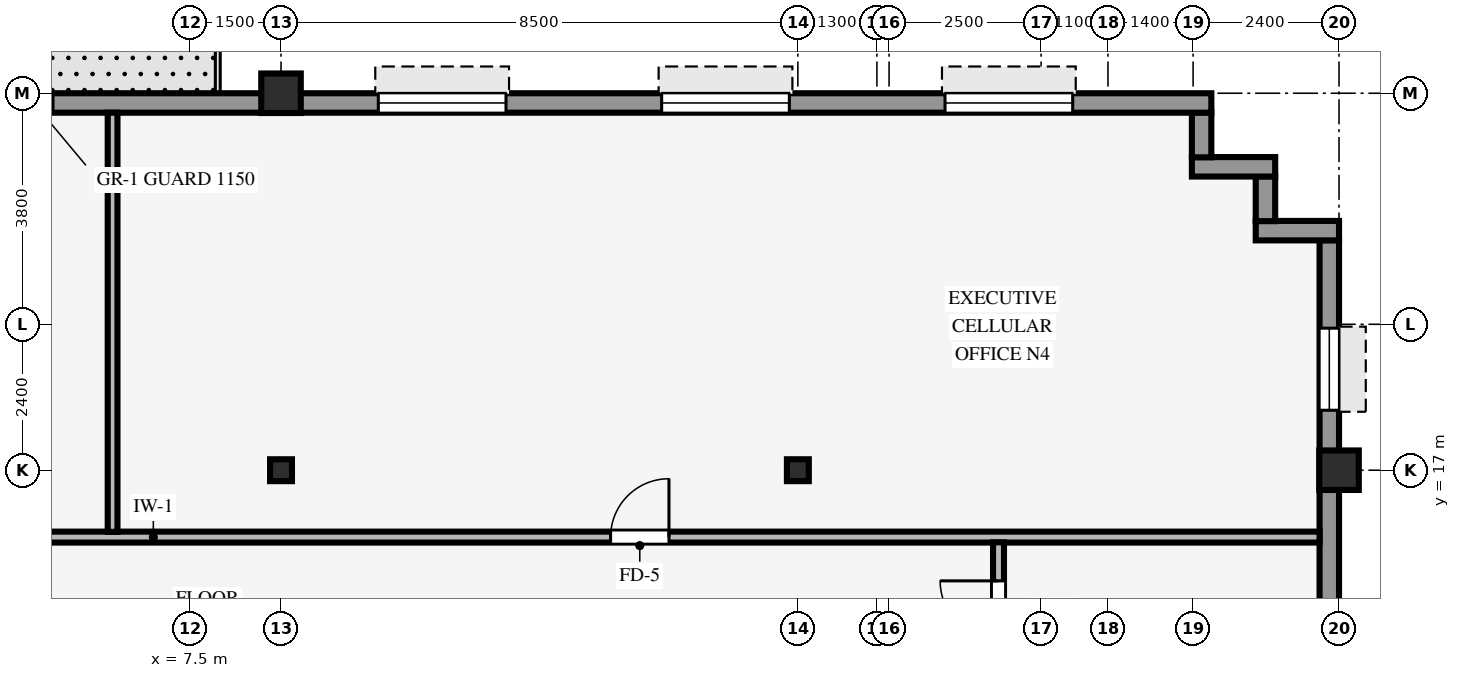
"""IFC4 building model, lengths in metres.
Left out: names, types, materials, properties, quantities, classifications, styles, units other than length and angle.
Written with IfcOpenShell. Run it as: python <this file> out.ifc"""

import sys

from ifc_helpers import new_model, si_unit, direction, frame, frame_2d, origin, origin_2d, place, context, subcontext, project, spatial, rectangle, hollow_rectangle, i_section, extrude, source, transform, mapped, element, fill, save


model = new_model("IFC4")
c1 = context("Model", 3, precision=1e-05, world=origin(), true_north=direction((0.0, 1.0)))
c2 = subcontext(c1, "Body", "Model", "MODEL_VIEW")
j1 = project(units=[si_unit("LENGTHUNIT", "METRE"), si_unit("PLANEANGLEUNIT", "RADIAN")], contexts=[c1])
p1 = place(None, origin())
s1 = spatial("IfcSite", under=j1, at=p1, CompositionType="ELEMENT")
p2 = place(p1, origin())
s2 = spatial("IfcBuilding", under=s1, at=p2, CompositionType="ELEMENT")
p3 = place(p2, frame((0.0, 0.0, 160.35)))
s3 = spatial("IfcBuildingStorey", under=s2, at=p3, CompositionType="ELEMENT", Elevation=160.35)
for number, where, z_axis, x_axis in (
    (1, (26.4, 17.0, 0.0), (0.0, 0.0, 1.0), (1.0, 0.0, 0.0)),
    (2, (9.0, 23.2, 0.0), (0.0, 0.0, 1.0), (1.0, 0.0, 0.0)),
):
    element("IfcColumn", number, at=place(p3, frame(where, z_axis=z_axis, x_axis=x_axis)), inside=s3, PredefinedType="COLUMN", context=c2, shape_type="SweptSolid", body=[
        extrude(hollow_rectangle(XDim=0.65, YDim=0.65, WallThickness=0.04, InnerFilletRadius=0.04, OuterFilletRadius=0.08, at=origin_2d()), origin(), (0.0, 0.0, 1.0), 3.37),
    ])
for number, where, z_axis, x_axis in (
    (3, (9.0, 17.0, 0.0), (0.0, 0.0, 1.0), (1.0, 0.0, 0.0)),
    (4, (17.5, 17.0, 0.0), (0.0, 0.0, 1.0), (1.0, 0.0, 0.0)),
):
    element("IfcColumn", number, at=place(p3, frame(where, z_axis=z_axis, x_axis=x_axis)), inside=s3, PredefinedType="COLUMN", context=c2, shape_type="SweptSolid", body=[
        extrude(i_section(OverallWidth=0.36, OverallDepth=0.36, WebThickness=0.021, FlangeThickness=0.021, FilletRadius=0.018, at=origin_2d()), origin(), (0.0, 0.0, 1.0), 3.37),
    ])
p4 = place(p3, frame((26.24, -20.784, 0.0), z_axis=(0.0, 0.0, 1.0), x_axis=(0.0, 1.0, 0.0)))
e5 = element("IfcWall", 5, at=p4, inside=s3, PredefinedType="STANDARD", context=c2, shape_type="SweptSolid", body=[
    extrude(rectangle(XDim=41.568, YDim=0.32, at=frame_2d((20.784, 0.0))), origin(), (0.0, 0.0, 1.0), 2.705),
])
p5 = place(p4, frame((1.448, 0.0, 0.8)))
e6 = element("IfcOpeningElement", 6, at=p5, cuts=e5, PredefinedType="OPENING", context=c2, shape_type="SweptSolid", body=[
    extrude(rectangle(XDim=1.35, YDim=1.56, at=frame_2d((0.675, 0.78))), frame((0.0, 0.17, 0.0), z_axis=(0.0, -1.0, 0.0), x_axis=(1.0, 0.0, 0.0)), (0.0, 0.0, 1.0), 0.34),
])
p6 = place(p4, frame((7.744, 0.0, 0.8)))
e7 = element("IfcOpeningElement", 7, at=p6, cuts=e5, PredefinedType="OPENING", context=c2, shape_type="SweptSolid", body=[
    extrude(rectangle(XDim=1.35, YDim=1.56, at=frame_2d((0.675, 0.78))), frame((0.0, 0.17, 0.0), z_axis=(0.0, -1.0, 0.0), x_axis=(1.0, 0.0, 0.0)), (0.0, 0.0, 1.0), 0.34),
])
p7 = place(p4, frame((12.69, 0.0, 0.8)))
e8 = element("IfcOpeningElement", 8, at=p7, cuts=e5, PredefinedType="OPENING", context=c2, shape_type="SweptSolid", body=[
    extrude(rectangle(XDim=1.35, YDim=1.56, at=frame_2d((0.675, 0.78))), frame((0.0, 0.17, 0.0), z_axis=(0.0, -1.0, 0.0), x_axis=(1.0, 0.0, 0.0)), (0.0, 0.0, 1.0), 0.34),
])
p8 = place(p4, frame((17.636, 0.0, 0.8)))
e9 = element("IfcOpeningElement", 9, at=p8, cuts=e5, PredefinedType="OPENING", context=c2, shape_type="SweptSolid", body=[
    extrude(rectangle(XDim=1.35, YDim=1.56, at=frame_2d((0.675, 0.78))), frame((0.0, 0.17, 0.0), z_axis=(0.0, -1.0, 0.0), x_axis=(1.0, 0.0, 0.0)), (0.0, 0.0, 1.0), 0.34),
])
p9 = place(p4, frame((22.582, 0.0, 0.8)))
e10 = element("IfcOpeningElement", 10, at=p9, cuts=e5, PredefinedType="OPENING", context=c2, shape_type="SweptSolid", body=[
    extrude(rectangle(XDim=1.35, YDim=1.56, at=frame_2d((0.675, 0.78))), frame((0.0, 0.17, 0.0), z_axis=(0.0, -1.0, 0.0), x_axis=(1.0, 0.0, 0.0)), (0.0, 0.0, 1.0), 0.34),
])
p10 = place(p4, frame((27.528, 0.0, 0.8)))
e11 = element("IfcOpeningElement", 11, at=p10, cuts=e5, PredefinedType="OPENING", context=c2, shape_type="SweptSolid", body=[
    extrude(rectangle(XDim=1.35, YDim=1.56, at=frame_2d((0.675, 0.78))), frame((0.0, 0.17, 0.0), z_axis=(0.0, -1.0, 0.0), x_axis=(1.0, 0.0, 0.0)), (0.0, 0.0, 1.0), 0.34),
])
p11 = place(p4, frame((32.474, 0.0, 0.8)))
e12 = element("IfcOpeningElement", 12, at=p11, cuts=e5, PredefinedType="OPENING", context=c2, shape_type="SweptSolid", body=[
    extrude(rectangle(XDim=1.35, YDim=1.56, at=frame_2d((0.675, 0.78))), frame((0.0, 0.17, 0.0), z_axis=(0.0, -1.0, 0.0), x_axis=(1.0, 0.0, 0.0)), (0.0, 0.0, 1.0), 0.34),
])
p12 = place(p4, frame((38.77, 0.0, 0.8)))
e13 = element("IfcOpeningElement", 13, at=p12, cuts=e5, PredefinedType="OPENING", context=c2, shape_type="SweptSolid", body=[
    extrude(rectangle(XDim=1.35, YDim=1.56, at=frame_2d((0.675, 0.78))), frame((0.0, 0.17, 0.0), z_axis=(0.0, -1.0, 0.0), x_axis=(1.0, 0.0, 0.0)), (0.0, 0.0, 1.0), 0.34),
])
p13 = place(p3, frame((25.03, 20.94, 0.0), z_axis=(0.0, 0.0, 1.0), x_axis=(1.0, 0.0, 0.0)))
e14 = element("IfcWall", 14, at=p13, inside=s3, PredefinedType="STANDARD", context=c2, shape_type="SweptSolid", body=[
    extrude(rectangle(XDim=1.37, YDim=0.32, at=frame_2d((0.685, 0.0))), origin(), (0.0, 0.0, 1.0), 3.36),
])
p14 = place(p3, frame((25.19, 21.096, 0.0), z_axis=(0.0, 0.0, 1.0), x_axis=(0.0, 1.0, 0.0)))
e15 = element("IfcWall", 15, at=p14, inside=s3, PredefinedType="STANDARD", context=c2, shape_type="SweptSolid", body=[
    extrude(rectangle(XDim=0.738, YDim=0.32, at=frame_2d((0.369, 0.0))), origin(), (0.0, 0.0, 1.0), 3.36),
])
p15 = place(p3, frame((23.98, 21.99, 0.0), z_axis=(0.0, 0.0, 1.0), x_axis=(1.0, 0.0, 0.0)))
e16 = element("IfcWall", 16, at=p15, inside=s3, PredefinedType="STANDARD", context=c2, shape_type="SweptSolid", body=[
    extrude(rectangle(XDim=1.37, YDim=0.32, at=frame_2d((0.685, 0.0))), origin(), (0.0, 0.0, 1.0), 3.36),
])
p16 = place(p3, frame((24.14, 22.146, 0.0), z_axis=(0.0, 0.0, 1.0), x_axis=(0.0, 1.0, 0.0)))
e17 = element("IfcWall", 17, at=p16, inside=s3, PredefinedType="STANDARD", context=c2, shape_type="SweptSolid", body=[
    extrude(rectangle(XDim=0.738, YDim=0.32, at=frame_2d((0.369, 0.0))), origin(), (0.0, 0.0, 1.0), 3.36),
])
p17 = place(p3, frame((-24.3, 23.04, 0.0), z_axis=(0.0, 0.0, 1.0), x_axis=(1.0, 0.0, 0.0)))
e18 = element("IfcWall", 18, at=p17, inside=s3, PredefinedType="STANDARD", context=c2, shape_type="SweptSolid", body=[
    extrude(rectangle(XDim=48.6, YDim=0.32, at=frame_2d((24.3, 0.0))), origin(), (0.0, 0.0, 1.0), 2.705),
])
p18 = place(p17, frame((28.5, 0.0, 0.0)))
e19 = element("IfcOpeningElement", 19, at=p18, cuts=e18, PredefinedType="OPENING", context=c2, shape_type="SweptSolid", body=[
    extrude(rectangle(XDim=1.05, YDim=2.1, at=frame_2d((0.525, 1.05))), frame((0.0, 0.17, 0.0), z_axis=(0.0, -1.0, 0.0), x_axis=(1.0, 0.0, 0.0)), (0.0, 0.0, 1.0), 0.34),
])
p19 = place(p17, frame((2.28, 0.0, 0.8)))
e20 = element("IfcOpeningElement", 20, at=p19, cuts=e18, PredefinedType="OPENING", context=c2, shape_type="SweptSolid", body=[
    extrude(rectangle(XDim=2.1, YDim=1.56, at=frame_2d((1.05, 0.78))), frame((0.0, 0.17, 0.0), z_axis=(0.0, -1.0, 0.0), x_axis=(1.0, 0.0, 0.0)), (0.0, 0.0, 1.0), 0.34),
])
p20 = place(p17, frame((6.94, 0.0, 0.8)))
e21 = element("IfcOpeningElement", 21, at=p20, cuts=e18, PredefinedType="OPENING", context=c2, shape_type="SweptSolid", body=[
    extrude(rectangle(XDim=2.1, YDim=1.56, at=frame_2d((1.05, 0.78))), frame((0.0, 0.17, 0.0), z_axis=(0.0, -1.0, 0.0), x_axis=(1.0, 0.0, 0.0)), (0.0, 0.0, 1.0), 0.34),
])
p21 = place(p17, frame((11.6, 0.0, 0.8)))
e22 = element("IfcOpeningElement", 22, at=p21, cuts=e18, PredefinedType="OPENING", context=c2, shape_type="SweptSolid", body=[
    extrude(rectangle(XDim=2.1, YDim=1.56, at=frame_2d((1.05, 0.78))), frame((0.0, 0.17, 0.0), z_axis=(0.0, -1.0, 0.0), x_axis=(1.0, 0.0, 0.0)), (0.0, 0.0, 1.0), 0.34),
])
p22 = place(p17, frame((17.61, 0.0, 0.8)))
e23 = element("IfcOpeningElement", 23, at=p22, cuts=e18, PredefinedType="OPENING", context=c2, shape_type="SweptSolid", body=[
    extrude(rectangle(XDim=2.1, YDim=1.56, at=frame_2d((1.05, 0.78))), frame((0.0, 0.17, 0.0), z_axis=(0.0, -1.0, 0.0), x_axis=(1.0, 0.0, 0.0)), (0.0, 0.0, 1.0), 0.34),
])
p23 = place(p17, frame((20.92, 0.0, 0.8)))
e24 = element("IfcOpeningElement", 24, at=p23, cuts=e18, PredefinedType="OPENING", context=c2, shape_type="SweptSolid", body=[
    extrude(rectangle(XDim=2.1, YDim=1.56, at=frame_2d((1.05, 0.78))), frame((0.0, 0.17, 0.0), z_axis=(0.0, -1.0, 0.0), x_axis=(1.0, 0.0, 0.0)), (0.0, 0.0, 1.0), 0.34),
])
p24 = place(p17, frame((25.58, 0.0, 0.8)))
e25 = element("IfcOpeningElement", 25, at=p24, cuts=e18, PredefinedType="OPENING", context=c2, shape_type="SweptSolid", body=[
    extrude(rectangle(XDim=2.1, YDim=1.56, at=frame_2d((1.05, 0.78))), frame((0.0, 0.17, 0.0), z_axis=(0.0, -1.0, 0.0), x_axis=(1.0, 0.0, 0.0)), (0.0, 0.0, 1.0), 0.34),
])
p25 = place(p17, frame((34.9, 0.0, 0.8)))
e26 = element("IfcOpeningElement", 26, at=p25, cuts=e18, PredefinedType="OPENING", context=c2, shape_type="SweptSolid", body=[
    extrude(rectangle(XDim=2.1, YDim=1.56, at=frame_2d((1.05, 0.78))), frame((0.0, 0.17, 0.0), z_axis=(0.0, -1.0, 0.0), x_axis=(1.0, 0.0, 0.0)), (0.0, 0.0, 1.0), 0.34),
])
p26 = place(p17, frame((39.56, 0.0, 0.8)))
e27 = element("IfcOpeningElement", 27, at=p26, cuts=e18, PredefinedType="OPENING", context=c2, shape_type="SweptSolid", body=[
    extrude(rectangle(XDim=2.1, YDim=1.56, at=frame_2d((1.05, 0.78))), frame((0.0, 0.17, 0.0), z_axis=(0.0, -1.0, 0.0), x_axis=(1.0, 0.0, 0.0)), (0.0, 0.0, 1.0), 0.34),
])
p27 = place(p17, frame((44.22, 0.0, 0.8)))
e28 = element("IfcOpeningElement", 28, at=p27, cuts=e18, PredefinedType="OPENING", context=c2, shape_type="SweptSolid", body=[
    extrude(rectangle(XDim=2.1, YDim=1.56, at=frame_2d((1.05, 0.78))), frame((0.0, 0.17, 0.0), z_axis=(0.0, -1.0, 0.0), x_axis=(1.0, 0.0, 0.0)), (0.0, 0.0, 1.0), 0.34),
])
p28 = place(p3, frame((-26.08, 15.9, 0.0), z_axis=(0.0, 0.0, 1.0), x_axis=(1.0, 0.0, 0.0)))
e29 = element("IfcWall", 29, at=p28, inside=s3, PredefinedType="PARTITIONING", context=c2, shape_type="SweptSolid", body=[
    extrude(rectangle(XDim=52.16, YDim=0.18, at=frame_2d((26.08, 0.0))), origin(), (0.0, 0.0, 1.0), 3.36),
])
p29 = place(p28, frame((24.5, 0.0, 0.0)))
e30 = element("IfcOpeningElement", 30, at=p29, cuts=e29, PredefinedType="OPENING", context=c2, shape_type="SweptSolid", body=[
    extrude(rectangle(XDim=0.96, YDim=2.1, at=frame_2d((0.48, 1.05))), frame((0.0, 0.1, 0.0), z_axis=(0.0, -1.0, 0.0), x_axis=(1.0, 0.0, 0.0)), (0.0, 0.0, 1.0), 0.2),
])
p30 = place(p28, frame((40.5, 0.0, 0.0)))
e31 = element("IfcOpeningElement", 31, at=p30, cuts=e29, PredefinedType="OPENING", context=c2, shape_type="SweptSolid", body=[
    extrude(rectangle(XDim=0.96, YDim=2.1, at=frame_2d((0.48, 1.05))), frame((0.0, 0.1, 0.0), z_axis=(0.0, -1.0, 0.0), x_axis=(1.0, 0.0, 0.0)), (0.0, 0.0, 1.0), 0.2),
])
p31 = place(p28, frame((13.16, 0.0, 0.0)))
e32 = element("IfcOpeningElement", 32, at=p31, cuts=e29, PredefinedType="OPENING", context=c2, shape_type="SweptSolid", body=[
    extrude(rectangle(XDim=0.96, YDim=2.1, at=frame_2d((0.48, 1.05))), frame((0.0, 0.1, 0.0), z_axis=(0.0, -1.0, 0.0), x_axis=(1.0, 0.0, 0.0)), (0.0, 0.0, 1.0), 0.2),
])
p32 = place(p28, frame((6.425, 0.0, 0.0)))
e33 = element("IfcOpeningElement", 33, at=p32, cuts=e29, PredefinedType="OPENING", context=c2, shape_type="SweptSolid", body=[
    extrude(rectangle(XDim=0.96, YDim=2.1, at=frame_2d((0.48, 1.05))), frame((0.0, 0.1, 0.0), z_axis=(0.0, -1.0, 0.0), x_axis=(1.0, 0.0, 0.0)), (0.0, 0.0, 1.0), 0.2),
])
p33 = place(p3, frame((6.23, 15.986, 0.0), z_axis=(0.0, 0.0, 1.0), x_axis=(0.0, 1.0, 0.0)))
e34 = element("IfcWall", 34, at=p33, inside=s3, PredefinedType="PARTITIONING", context=c2, shape_type="SweptSolid", body=[
    extrude(rectangle(XDim=6.894, YDim=0.16, at=frame_2d((3.447, 0.0))), origin(), (0.0, 0.0, 1.0), 3.36),
])
p34 = place(p3, frame((20.8, 13.586, 0.0), z_axis=(0.0, 0.0, 1.0), x_axis=(0.0, 1.0, 0.0)))
e35 = element("IfcWall", 35, at=p34, inside=s3, PredefinedType="PARTITIONING", context=c2, shape_type="SweptSolid", body=[
    extrude(rectangle(XDim=2.228, YDim=0.18, at=frame_2d((1.114, 0.0))), origin(), (0.0, 0.0, 1.0), 3.36),
])
p35 = place(p34, frame((0.634, 0.0, 0.0)))
e36 = element("IfcOpeningElement", 36, at=p35, cuts=e35, PredefinedType="OPENING", context=c2, shape_type="SweptSolid", body=[
    extrude(rectangle(XDim=0.96, YDim=2.1, at=frame_2d((0.48, 1.05))), frame((0.0, 0.1, 0.0), z_axis=(0.0, -1.0, 0.0), x_axis=(1.0, 0.0, 0.0)), (0.0, 0.0, 1.0), 0.2),
])
m1 = source(origin(), c2, "Body", "SweptSolid", [
    extrude(rectangle(XDim=1.35, YDim=1.56, at=frame_2d((0.675, 0.78))), frame((0.0, 0.03, 0.0), z_axis=(0.0, -1.0, 0.0), x_axis=(1.0, 0.0, 0.0)), (0.0, 0.0, 1.0), 0.06),
])
p36 = place(p12, origin())
e37 = element("IfcWindow", 37, at=p36, inside=s3, PartitioningType="SINGLE_PANEL", PredefinedType="WINDOW", context=c2, shape_type="MappedRepresentation", body=[
    mapped(m1, transform((0.0, 0.0, 0.0), scale=1.0)),
])
fill(e13, e37)
m2 = source(origin(), c2, "Body", "SweptSolid", [
    extrude(rectangle(XDim=1.05, YDim=2.1, at=frame_2d((0.525, 1.05))), frame((0.0, 0.025, 0.0), z_axis=(0.0, -1.0, 0.0), x_axis=(1.0, 0.0, 0.0)), (0.0, 0.0, 1.0), 0.05),
])
p37 = place(p18, origin())
e38 = element("IfcDoor", 38, at=p37, inside=s3, OperationType="SINGLE_SWING_LEFT", PredefinedType="DOOR", context=c2, shape_type="MappedRepresentation", body=[
    mapped(m2, transform((0.0, 0.0, 0.0), scale=1.0)),
])
fill(e19, e38)
m3 = source(origin(), c2, "Body", "SweptSolid", [
    extrude(rectangle(XDim=2.1, YDim=1.56, at=frame_2d((1.05, 0.78))), frame((0.0, 0.03, 0.0), z_axis=(0.0, -1.0, 0.0), x_axis=(1.0, 0.0, 0.0)), (0.0, 0.0, 1.0), 0.06),
])
p38 = place(p25, origin())
e39 = element("IfcWindow", 39, at=p38, inside=s3, PartitioningType="SINGLE_PANEL", PredefinedType="WINDOW", context=c2, shape_type="MappedRepresentation", body=[
    mapped(m3, transform((0.0, 0.0, 0.0), scale=1.0)),
])
fill(e26, e39)
p39 = place(p26, origin())
e40 = element("IfcWindow", 40, at=p39, inside=s3, PartitioningType="SINGLE_PANEL", PredefinedType="WINDOW", context=c2, shape_type="MappedRepresentation", body=[
    mapped(m3, transform((0.0, 0.0, 0.0), scale=1.0)),
])
fill(e27, e40)
p40 = place(p27, origin())
e41 = element("IfcWindow", 41, at=p40, inside=s3, PartitioningType="SINGLE_PANEL", PredefinedType="WINDOW", context=c2, shape_type="MappedRepresentation", body=[
    mapped(m3, transform((0.0, 0.0, 0.0), scale=1.0)),
])
fill(e28, e41)
m4 = source(origin(), c2, "Body", "SweptSolid", [
    extrude(rectangle(XDim=0.96, YDim=2.1, at=frame_2d((0.48, 1.05))), frame((0.0, 0.025, 0.0), z_axis=(0.0, -1.0, 0.0), x_axis=(1.0, 0.0, 0.0)), (0.0, 0.0, 1.0), 0.05),
])
p41 = place(p30, origin())
e42 = element("IfcDoor", 42, at=p41, inside=s3, OperationType="SINGLE_SWING_RIGHT", PredefinedType="DOOR", context=c2, shape_type="MappedRepresentation", body=[
    mapped(m4, transform((0.0, 0.0, 0.0), scale=1.0)),
])
fill(e31, e42)
p42 = place(p35, origin())
e43 = element("IfcDoor", 43, at=p42, inside=s3, OperationType="SINGLE_SWING_RIGHT", PredefinedType="DOOR", context=c2, shape_type="MappedRepresentation", body=[
    mapped(m4, transform((0.0, 0.0, 0.0), scale=1.0)),
])
fill(e36, e43)
save(model, sys.argv[1])
